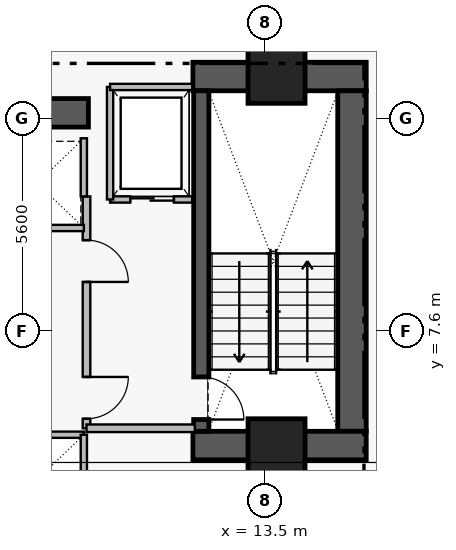
"""IFC4 building model, lengths in metres.
Left out: names, types, materials, properties, quantities, classifications, styles, units other than length and angle.
Written with IfcOpenShell. Run it as: python <this file> out.ifc"""

import sys

from ifc_helpers import new_model, si_unit, direction, frame, frame_2d, origin, origin_2d, place, context, subcontext, project, spatial, rectangle, extrude, element, fill, save


model = new_model("IFC4")
c1 = context("Model", 3, precision=1e-05, world=origin(), true_north=direction((0.0, 1.0)))
c2 = subcontext(c1, "Body", "Model", "MODEL_VIEW")
j1 = project(units=[si_unit("LENGTHUNIT", "METRE"), si_unit("PLANEANGLEUNIT", "RADIAN")], contexts=[c1])
p1 = place(None, origin())
s1 = spatial("IfcSite", under=j1, at=p1, CompositionType="ELEMENT")
p2 = place(p1, origin())
s2 = spatial("IfcBuilding", under=s1, at=p2, CompositionType="ELEMENT")
p3 = place(p2, frame((0.0, 0.0, 110.25)))
s3 = spatial("IfcBuildingStorey", under=s2, at=p3, CompositionType="ELEMENT", Elevation=110.25)
p4 = place(p3, frame((11.6, 14.305, 0.0), z_axis=(0.0, 0.0, 1.0), x_axis=(1.0, 0.0, 0.0)))
e1 = element("IfcWall", 1, at=p4, inside=s3, PredefinedType="SHEAR", context=c2, shape_type="SweptSolid", body=[
    extrude(rectangle(XDim=4.56, YDim=0.75, at=frame_2d((2.28, 0.0))), origin(), (0.0, 0.0, 1.0), 3.46),
])
p5 = place(p3, frame((15.785, 4.97, 0.0), z_axis=(0.0, 0.0, 1.0), x_axis=(0.0, 1.0, 0.0)))
e2 = element("IfcWall", 2, at=p5, inside=s3, PredefinedType="SHEAR", context=c2, shape_type="SweptSolid", body=[
    extrude(rectangle(XDim=8.96, YDim=0.75, at=frame_2d((4.48, 0.0))), origin(), (0.0, 0.0, 1.0), 3.46),
])
p6 = place(p3, frame((11.6, 4.595, 0.0), z_axis=(0.0, 0.0, 1.0), x_axis=(1.0, 0.0, 0.0)))
e3 = element("IfcWall", 3, at=p6, inside=s3, PredefinedType="SHEAR", context=c2, shape_type="SweptSolid", body=[
    extrude(rectangle(XDim=4.56, YDim=0.75, at=frame_2d((2.28, 0.0))), origin(), (0.0, 0.0, 1.0), 3.46),
])
p7 = place(p3, frame((1.25, 13.35, 0.0), z_axis=(0.0, 0.0, 1.0), x_axis=(1.0, 0.0, 0.0)))
e4 = element("IfcWall", 4, at=p7, inside=s3, PredefinedType="SHEAR", context=c2, shape_type="SweptSolid", body=[
    extrude(rectangle(XDim=7.6, YDim=0.75, at=frame_2d((3.8, 0.0))), origin(), (0.0, 0.0, 1.0), 3.43),
])
p8 = place(p3, frame((11.82, 13.93, 0.0), z_axis=(0.0, 0.0, 1.0), x_axis=(0.0, -1.0, 0.0)))
e5 = element("IfcWall", 5, at=p8, inside=s3, PredefinedType="SHEAR", context=c2, shape_type="SweptSolid", body=[
    extrude(rectangle(XDim=8.96, YDim=0.4, at=frame_2d((4.48, 0.0))), origin(), (0.0, 0.0, 1.0), 3.46),
])
p9 = place(p8, frame((7.53, 0.0, 0.0)))
e6 = element("IfcOpeningElement", 6, at=p9, cuts=e5, PredefinedType="OPENING", context=c2, shape_type="SweptSolid", body=[
    extrude(rectangle(XDim=1.12, YDim=2.22, at=frame_2d((0.56, 1.11))), frame((0.0, 0.21, 0.0), z_axis=(0.0, -1.0, 0.0), x_axis=(1.0, 0.0, 0.0)), (0.0, 0.0, 1.0), 0.42),
])
for number, where, z_axis, x_axis in (
    (7, (13.8, 14.35, 0.0), (0.0, 0.0, 1.0), (1.0, 0.0, 0.0)),
    (8, (13.8, 4.55, 0.0), (0.0, 0.0, 1.0), (1.0, 0.0, 0.0)),
):
    element("IfcColumn", number, at=place(p3, frame(where, z_axis=z_axis, x_axis=x_axis)), inside=s3, PredefinedType="COLUMN", context=c2, shape_type="SweptSolid", body=[
        extrude(rectangle(XDim=1.5, YDim=1.5, at=origin_2d()), origin(), (0.0, 0.0, 1.0), 3.65),
    ])
p10 = place(p3, frame((8.8, 11.15, 0.0), z_axis=(0.0, 0.0, 1.0), x_axis=(0.0, -1.0, 0.0)))
e9 = element("IfcWall", 9, at=p10, inside=s3, PredefinedType="PARTITIONING", context=c2, shape_type="SweptSolid", body=[
    extrude(rectangle(XDim=6.1, YDim=0.2, at=frame_2d((3.05, 0.0))), origin(), (0.0, 0.0, 1.0), 3.43),
])
p11 = place(p10, frame((1.15, 0.0, 0.0)))
e10 = element("IfcOpeningElement", 10, at=p11, cuts=e9, PredefinedType="OPENING", context=c2, shape_type="SweptSolid", body=[
    extrude(rectangle(XDim=1.1, YDim=2.2, at=frame_2d((0.55, 1.1))), frame((0.0, 0.11, 0.0), z_axis=(0.0, -1.0, 0.0), x_axis=(1.0, 0.0, 0.0)), (0.0, 0.0, 1.0), 0.22),
])
p12 = place(p10, frame((4.75, 0.0, 0.0)))
e11 = element("IfcOpeningElement", 11, at=p12, cuts=e9, PredefinedType="OPENING", context=c2, shape_type="SweptSolid", body=[
    extrude(rectangle(XDim=1.1, YDim=2.2, at=frame_2d((0.55, 1.1))), frame((0.0, 0.11, 0.0), z_axis=(0.0, -1.0, 0.0), x_axis=(1.0, 0.0, 0.0)), (0.0, 0.0, 1.0), 0.22),
])
p13 = place(p3, frame((9.42, 11.07, 0.0), z_axis=(0.0, 0.0, 1.0), x_axis=(1.0, 0.0, 0.0)))
e12 = element("IfcWall", 12, at=p13, inside=s3, PredefinedType="PARTITIONING", context=c2, shape_type="SweptSolid", body=[
    extrude(rectangle(XDim=2.16, YDim=0.165, at=frame_2d((1.08, 0.0))), origin(), (0.0, 0.0, 1.0), 3.43),
])
p14 = place(p13, frame((0.53, 0.0, 0.0)))
e13 = element("IfcOpeningElement", 13, at=p14, cuts=e12, PredefinedType="OPENING", context=c2, shape_type="SweptSolid", body=[
    extrude(rectangle(XDim=1.15, YDim=2.25, at=frame_2d((0.575, 1.125))), frame((0.0, 0.093, 0.0), z_axis=(0.0, -1.0, 0.0), x_axis=(1.0, 0.0, 0.0)), (0.0, 0.0, 1.0), 0.185),
])
p15 = place(p3, frame((8.8, 5.05, 0.0), z_axis=(0.0, 0.0, 1.0), x_axis=(1.0, 0.0, 0.0)))
e14 = element("IfcWall", 14, at=p15, inside=s3, PredefinedType="PARTITIONING", context=c2, shape_type="SweptSolid", body=[
    extrude(rectangle(XDim=2.85, YDim=0.2, at=frame_2d((1.425, 0.0))), origin(), (0.0, 0.0, 1.0), 3.43),
])
p16 = place(p3, frame((9.42, 11.07, 0.0), z_axis=(0.0, 0.0, 1.0), x_axis=(0.0, 1.0, 0.0)))
e15 = element("IfcWall", 15, at=p16, inside=s3, PredefinedType="PARTITIONING", context=c2, shape_type="SweptSolid", body=[
    extrude(rectangle(XDim=2.96, YDim=0.165, at=frame_2d((1.48, 0.0))), origin(), (0.0, 0.0, 1.0), 3.43),
])
p17 = place(p3, frame((9.42, 14.03, 0.0), z_axis=(0.0, 0.0, 1.0), x_axis=(1.0, 0.0, 0.0)))
e16 = element("IfcWall", 16, at=p17, inside=s3, PredefinedType="PARTITIONING", context=c2, shape_type="SweptSolid", body=[
    extrude(rectangle(XDim=2.16, YDim=0.165, at=frame_2d((1.08, 0.0))), origin(), (0.0, 0.0, 1.0), 3.43),
])
p18 = place(p3, frame((6.25, 4.88, 0.0), z_axis=(0.0, 0.0, 1.0), x_axis=(1.0, 0.0, 0.0)))
e17 = element("IfcWall", 17, at=p18, inside=s3, PredefinedType="PARTITIONING", context=c2, shape_type="SweptSolid", body=[
    extrude(rectangle(XDim=2.48, YDim=0.165, at=frame_2d((1.24, 0.0))), origin(), (0.0, 0.0, 1.0), 3.43),
])
p19 = place(p3, frame((8.73, 2.52, 0.0), z_axis=(0.0, 0.0, 1.0), x_axis=(0.0, 1.0, 0.0)))
e18 = element("IfcWall", 18, at=p19, inside=s3, PredefinedType="PARTITIONING", context=c2, shape_type="SweptSolid", body=[
    extrude(rectangle(XDim=2.36, YDim=0.165, at=frame_2d((1.18, 0.0))), origin(), (0.0, 0.0, 1.0), 3.43),
])
p20 = place(p3, frame((6.25, 10.32, 0.0), z_axis=(0.0, 0.0, 1.0), x_axis=(1.0, 0.0, 0.0)))
e19 = element("IfcWall", 19, at=p20, inside=s3, PredefinedType="PARTITIONING", context=c2, shape_type="SweptSolid", body=[
    extrude(rectangle(XDim=2.48, YDim=0.165, at=frame_2d((1.24, 0.0))), origin(), (0.0, 0.0, 1.0), 3.43),
])
p21 = place(p3, frame((8.73, 11.15, 0.0), z_axis=(0.0, 0.0, 1.0), x_axis=(0.0, 1.0, 0.0)))
e20 = element("IfcWall", 20, at=p21, inside=s3, PredefinedType="PARTITIONING", context=c2, shape_type="SweptSolid", body=[
    extrude(rectangle(XDim=1.53, YDim=0.165, at=frame_2d((0.765, 0.0))), origin(), (0.0, 0.0, 1.0), 3.43),
])
p22 = place(p9, origin())
e21 = element("IfcDoor", 21, at=p22, inside=s3, OperationType="SINGLE_SWING_RIGHT", PredefinedType="DOOR", context=c2, shape_type="SweptSolid", body=[
    extrude(rectangle(XDim=1.12, YDim=2.22, at=frame_2d((0.56, 1.11))), frame((0.0, 0.025, 0.0), z_axis=(0.0, -1.0, 0.0), x_axis=(1.0, 0.0, 0.0)), (0.0, 0.0, 1.0), 0.05),
])
fill(e6, e21)
p23 = place(p11, origin())
e22 = element("IfcDoor", 22, at=p23, inside=s3, OperationType="SINGLE_SWING_RIGHT", PredefinedType="DOOR", context=c2, shape_type="SweptSolid", body=[
    extrude(rectangle(XDim=1.1, YDim=2.2, at=frame_2d((0.55, 1.1))), frame((0.0, 0.025, 0.0), z_axis=(0.0, -1.0, 0.0), x_axis=(1.0, 0.0, 0.0)), (0.0, 0.0, 1.0), 0.05),
])
fill(e10, e22)
p24 = place(p12, origin())
e23 = element("IfcDoor", 23, at=p24, inside=s3, OperationType="SINGLE_SWING_LEFT", PredefinedType="DOOR", context=c2, shape_type="SweptSolid", body=[
    extrude(rectangle(XDim=1.1, YDim=2.2, at=frame_2d((0.55, 1.1))), frame((0.0, 0.025, 0.0), z_axis=(0.0, -1.0, 0.0), x_axis=(1.0, 0.0, 0.0)), (0.0, 0.0, 1.0), 0.05),
])
fill(e11, e23)
p25 = place(p14, origin())
e24 = element("IfcDoor", 24, at=p25, inside=s3, OperationType="SLIDING_TO_LEFT", PredefinedType="DOOR", context=c2, shape_type="SweptSolid", body=[
    extrude(rectangle(XDim=1.15, YDim=2.25, at=frame_2d((0.575, 1.125))), frame((0.0, 0.025, 0.0), z_axis=(0.0, -1.0, 0.0), x_axis=(1.0, 0.0, 0.0)), (0.0, 0.0, 1.0), 0.05),
])
fill(e13, e24)
save(model, sys.argv[1])
